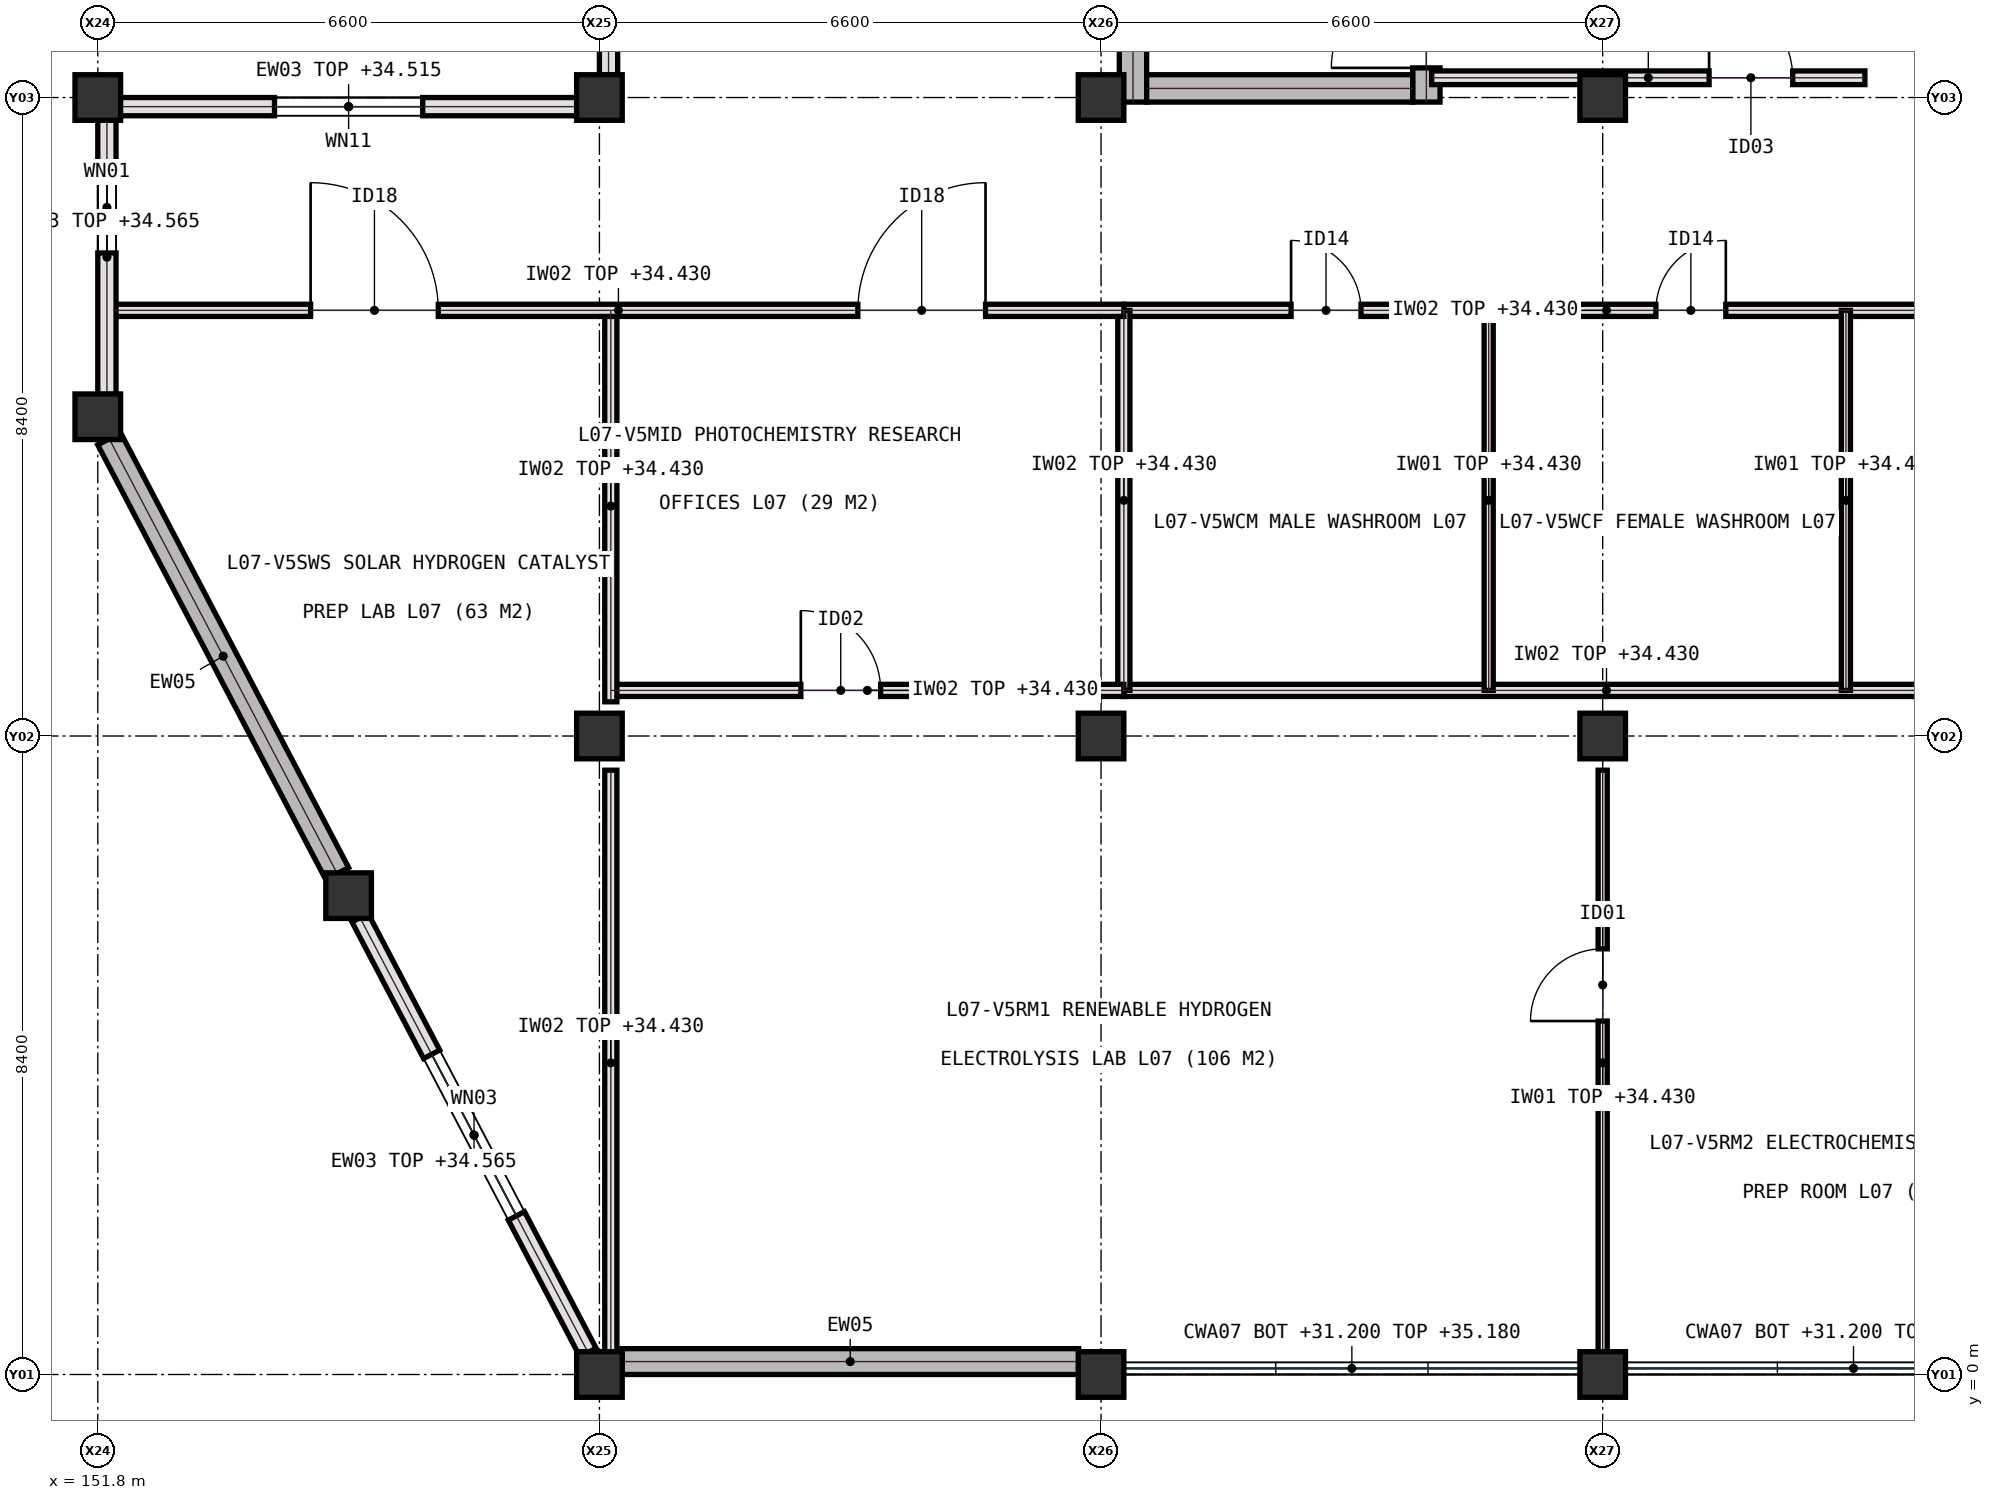
"""IFC4 building model, lengths in metres.
Left out: names, types, materials, properties, quantities, classifications, styles, units other than length and angle.
Written with IfcOpenShell. Run it as: python <this file> out.ifc"""

import sys

from ifc_helpers import new_model, si_unit, direction, frame, frame_2d, origin, origin_2d, place, context, subcontext, project, spatial, rectangle, extrude, element, fill, save


model = new_model("IFC4")
c1 = context("Model", 3, precision=1e-05, world=origin(), true_north=direction((0.0, 1.0)))
c2 = subcontext(c1, "Body", "Model", "MODEL_VIEW")
j1 = project(units=[si_unit("LENGTHUNIT", "METRE"), si_unit("PLANEANGLEUNIT", "RADIAN")], contexts=[c1])
p1 = place(None, origin())
s1 = spatial("IfcSite", under=j1, at=p1, CompositionType="ELEMENT")
p2 = place(p1, origin())
s2 = spatial("IfcBuilding", under=s1, at=p2, CompositionType="ELEMENT")
p3 = place(p2, frame((0.0, 0.0, 31.2)))
s3 = spatial("IfcBuildingStorey", under=s2, at=p3, CompositionType="ELEMENT", Elevation=31.2)
for number, where, z_axis, x_axis in (
    (1, (151.8, 16.8, 0.0), (0.0, 0.0, 1.0), (1.0, 0.0, 0.0)),
    (2, (158.4, 0.0, 0.0), (0.0, 0.0, 1.0), (1.0, 0.0, 0.0)),
    (3, (158.4, 8.4, 0.0), (0.0, 0.0, 1.0), (1.0, 0.0, 0.0)),
    (4, (158.4, 16.8, 0.0), (0.0, 0.0, 1.0), (1.0, 0.0, 0.0)),
    (5, (165.0, 0.0, 0.0), (0.0, 0.0, 1.0), (1.0, 0.0, 0.0)),
    (6, (165.0, 8.4, 0.0), (0.0, 0.0, 1.0), (1.0, 0.0, 0.0)),
    (7, (165.0, 16.8, 0.0), (0.0, 0.0, 1.0), (1.0, 0.0, 0.0)),
    (8, (171.6, 0.0, 0.0), (0.0, 0.0, 1.0), (1.0, 0.0, 0.0)),
    (9, (171.6, 8.4, 0.0), (0.0, 0.0, 1.0), (1.0, 0.0, 0.0)),
    (10, (171.6, 16.8, 0.0), (0.0, 0.0, 1.0), (1.0, 0.0, 0.0)),
    (11, (151.8, 12.6, 0.0), (0.0, 0.0, 1.0), (1.0, 0.0, 0.0)),
    (12, (155.1, 6.3, 0.0), (0.0, 0.0, 1.0), (1.0, 0.0, 0.0)),
):
    element("IfcColumn", number, at=place(p3, frame(where, z_axis=z_axis, x_axis=x_axis)), inside=s3, PredefinedType="COLUMN", context=c2, shape_type="SweptSolid", body=[
        extrude(rectangle(XDim=0.6, YDim=0.6, at=origin_2d()), origin(), (0.0, 0.0, 1.0), 4.2),
    ])
p4 = place(p3, frame((165.3, 14.0, 0.0), z_axis=(0.0, 0.0, 1.0), x_axis=(1.0, 0.0, 0.0)))
e13 = element("IfcWall", 13, at=p4, inside=s3, PredefinedType="PARTITIONING", context=c2, shape_type="SweptSolid", body=[
    extrude(rectangle(XDim=12.7, YDim=0.16, at=frame_2d((6.35, 0.0))), origin(), (0.0, 0.0, 1.0), 3.23),
])
p5 = place(p4, frame((2.2, 0.0, 0.0)))
e14 = element("IfcOpeningElement", 14, at=p5, cuts=e13, PredefinedType="OPENING", context=c2, shape_type="SweptSolid", body=[
    extrude(rectangle(XDim=0.92, YDim=2.08, at=frame_2d((0.46, 1.04))), frame((0.0, 0.09, 0.0), z_axis=(0.0, -1.0, 0.0), x_axis=(1.0, 0.0, 0.0)), (0.0, 0.0, 1.0), 0.18),
])
p6 = place(p4, frame((7.0, 0.0, 0.0)))
e15 = element("IfcOpeningElement", 15, at=p6, cuts=e13, PredefinedType="OPENING", context=c2, shape_type="SweptSolid", body=[
    extrude(rectangle(XDim=0.92, YDim=2.08, at=frame_2d((0.46, 1.04))), frame((0.0, 0.09, 0.0), z_axis=(0.0, -1.0, 0.0), x_axis=(1.0, 0.0, 0.0)), (0.0, 0.0, 1.0), 0.18),
])
p7 = place(p4, frame((11.0, 0.0, 0.0)))
e16 = element("IfcOpeningElement", 16, at=p7, cuts=e13, PredefinedType="OPENING", context=c2, shape_type="SweptSolid", body=[
    extrude(rectangle(XDim=0.92, YDim=2.08, at=frame_2d((0.46, 1.04))), frame((0.0, 0.09, 0.0), z_axis=(0.0, -1.0, 0.0), x_axis=(1.0, 0.0, 0.0)), (0.0, 0.0, 1.0), 0.18),
])
p8 = place(p3, frame((165.3, 9.0, 0.0), z_axis=(0.0, 0.0, 1.0), x_axis=(1.0, 0.0, 0.0)))
e17 = element("IfcWall", 17, at=p8, inside=s3, PredefinedType="PARTITIONING", context=c2, shape_type="SweptSolid", body=[
    extrude(rectangle(XDim=12.7, YDim=0.16, at=frame_2d((6.35, 0.0))), origin(), (0.0, 0.0, 1.0), 3.23),
])
p9 = place(p3, frame((165.3, 9.0, 0.0), z_axis=(0.0, 0.0, 1.0), x_axis=(0.0, 1.0, 0.0)))
e18 = element("IfcWall", 18, at=p9, inside=s3, PredefinedType="PARTITIONING", context=c2, shape_type="SweptSolid", body=[
    extrude(rectangle(XDim=5.0, YDim=0.16, at=frame_2d((2.5, 0.0))), origin(), (0.0, 0.0, 1.0), 3.23),
])
for number, where, z_axis, x_axis in (
    (19, (170.1, 9.0, 0.0), (0.0, 0.0, 1.0), (0.0, 1.0, 0.0)),
    (20, (174.8, 9.0, 0.0), (0.0, 0.0, 1.0), (0.0, 1.0, 0.0)),
):
    element("IfcWall", number, at=place(p3, frame(where, z_axis=z_axis, x_axis=x_axis)), inside=s3, PredefinedType="PARTITIONING", context=c2, shape_type="SweptSolid", body=[
        extrude(rectangle(XDim=5.0, YDim=0.12, at=frame_2d((2.5, 0.0))), origin(), (0.0, 0.0, 1.0), 3.23),
    ])
p10 = place(p3, frame((158.55, 9.0, 0.0), z_axis=(0.0, 0.0, 1.0), x_axis=(1.0, 0.0, 0.0)))
e21 = element("IfcWall", 21, at=p10, inside=s3, PredefinedType="PARTITIONING", context=c2, shape_type="SweptSolid", body=[
    extrude(rectangle(XDim=6.75, YDim=0.16, at=frame_2d((3.375, 0.0))), origin(), (0.0, 0.0, 1.0), 3.23),
])
p11 = place(p10, frame((2.5, 0.0, 0.0)))
e22 = element("IfcOpeningElement", 22, at=p11, cuts=e21, PredefinedType="OPENING", context=c2, shape_type="SweptSolid", body=[
    extrude(rectangle(XDim=1.05, YDim=2.15, at=frame_2d((0.525, 1.075))), frame((0.0, 0.09, 0.0), z_axis=(0.0, -1.0, 0.0), x_axis=(1.0, 0.0, 0.0)), (0.0, 0.0, 1.0), 0.18),
])
p12 = place(p3, frame((171.6, 0.25, 0.0), z_axis=(0.0, 0.0, 1.0), x_axis=(0.0, 1.0, 0.0)))
e23 = element("IfcWall", 23, at=p12, inside=s3, PredefinedType="PARTITIONING", context=c2, shape_type="SweptSolid", body=[
    extrude(rectangle(XDim=7.7, YDim=0.12, at=frame_2d((3.85, 0.0))), origin(), (0.0, 0.0, 1.0), 3.23),
])
p13 = place(p12, frame((4.4, 0.0, 0.0)))
e24 = element("IfcOpeningElement", 24, at=p13, cuts=e23, PredefinedType="OPENING", context=c2, shape_type="SweptSolid", body=[
    extrude(rectangle(XDim=0.95, YDim=2.15, at=frame_2d((0.475, 1.075))), frame((0.0, 0.07, 0.0), z_axis=(0.0, -1.0, 0.0), x_axis=(1.0, 0.0, 0.0)), (0.0, 0.0, 1.0), 0.14),
])
p14 = place(p3, frame((158.55, 0.25, 0.0), z_axis=(0.0, 0.0, 1.0), x_axis=(0.0, 1.0, 0.0)))
e25 = element("IfcWall", 25, at=p14, inside=s3, PredefinedType="PARTITIONING", context=c2, shape_type="SweptSolid", body=[
    extrude(rectangle(XDim=7.7, YDim=0.16, at=frame_2d((3.85, 0.0))), origin(), (0.0, 0.0, 1.0), 3.23),
])
p15 = place(p3, frame((158.55, 8.85, 0.0), z_axis=(0.0, 0.0, 1.0), x_axis=(0.0, 1.0, 0.0)))
e26 = element("IfcWall", 26, at=p15, inside=s3, PredefinedType="PARTITIONING", context=c2, shape_type="SweptSolid", body=[
    extrude(rectangle(XDim=5.15, YDim=0.16, at=frame_2d((2.575, 0.0))), origin(), (0.0, 0.0, 1.0), 3.23),
])
p16 = place(p3, frame((152.0, 14.0, 0.0), z_axis=(0.0, 0.0, 1.0), x_axis=(1.0, 0.0, 0.0)))
e27 = element("IfcWall", 27, at=p16, inside=s3, PredefinedType="PARTITIONING", context=c2, shape_type="SweptSolid", body=[
    extrude(rectangle(XDim=13.3, YDim=0.16, at=frame_2d((6.65, 0.0))), origin(), (0.0, 0.0, 1.0), 3.23),
])
p17 = place(p16, frame((2.6, 0.0, 0.0)))
e28 = element("IfcOpeningElement", 28, at=p17, cuts=e27, PredefinedType="OPENING", context=c2, shape_type="SweptSolid", body=[
    extrude(rectangle(XDim=1.68, YDim=2.28, at=frame_2d((0.84, 1.14))), frame((0.0, 0.09, 0.0), z_axis=(0.0, -1.0, 0.0), x_axis=(1.0, 0.0, 0.0)), (0.0, 0.0, 1.0), 0.18),
])
p18 = place(p16, frame((9.8, 0.0, 0.0)))
e29 = element("IfcOpeningElement", 29, at=p18, cuts=e27, PredefinedType="OPENING", context=c2, shape_type="SweptSolid", body=[
    extrude(rectangle(XDim=1.68, YDim=2.28, at=frame_2d((0.84, 1.14))), frame((0.0, 0.09, 0.0), z_axis=(0.0, -1.0, 0.0), x_axis=(1.0, 0.0, 0.0)), (0.0, 0.0, 1.0), 0.18),
])
p19 = place(p3, frame((158.105, 16.68, 0.0), z_axis=(0.0, 0.0, 1.0), x_axis=(-1.0, 0.0, 0.0)))
e30 = element("IfcWall", 30, at=p19, inside=s3, PredefinedType="SOLIDWALL", context=c2, shape_type="SweptSolid", body=[
    extrude(rectangle(XDim=6.01, YDim=0.24, at=frame_2d((3.005, 0.0))), origin(), (0.0, 0.0, 1.0), 3.315),
])
p20 = place(p19, frame((2.03, 0.0, 0.95)))
e31 = element("IfcOpeningElement", 31, at=p20, cuts=e30, PredefinedType="OPENING", context=c2, shape_type="SweptSolid", body=[
    extrude(rectangle(XDim=1.95, YDim=1.55, at=frame_2d((0.975, 0.775))), frame((0.0, 0.13, 0.0), z_axis=(0.0, -1.0, 0.0), x_axis=(1.0, 0.0, 0.0)), (0.0, 0.0, 1.0), 0.26),
])
p21 = place(p3, frame((158.695, 0.17, 0.0), z_axis=(0.0, 0.0, 1.0), x_axis=(1.0, 0.0, 0.0)))
e32 = element("IfcWall", 32, at=p21, inside=s3, PredefinedType="SHEAR", context=c2, shape_type="SweptSolid", body=[
    extrude(rectangle(XDim=6.01, YDim=0.34, at=frame_2d((3.005, 0.0))), origin(), (0.0, 0.0, 1.0), 3.98),
])
p22 = place(p3, frame((158.52, 24.905, 0.0), z_axis=(0.0, 0.0, 1.0), x_axis=(0.0, -1.0, 0.0)))
e33 = element("IfcWall", 33, at=p22, inside=s3, PredefinedType="SOLIDWALL", context=c2, shape_type="SweptSolid", body=[
    extrude(rectangle(XDim=7.81, YDim=0.24, at=frame_2d((3.905, 0.0))), origin(), (0.0, 0.0, 1.0), 3.265),
])
p23 = place(p22, frame((3.18, 0.0, 0.95)))
e34 = element("IfcOpeningElement", 34, at=p23, cuts=e33, PredefinedType="OPENING", context=c2, shape_type="SweptSolid", body=[
    extrude(rectangle(XDim=1.45, YDim=1.6, at=frame_2d((0.725, 0.8))), frame((0.0, 0.13, 0.0), z_axis=(0.0, -1.0, 0.0), x_axis=(1.0, 0.0, 0.0)), (0.0, 0.0, 1.0), 0.26),
])
p24 = place(p3, frame((151.92, 16.505, 0.0), z_axis=(0.0, 0.0, 1.0), x_axis=(0.0, -1.0, 0.0)))
e35 = element("IfcWall", 35, at=p24, inside=s3, PredefinedType="SOLIDWALL", context=c2, shape_type="SweptSolid", body=[
    extrude(rectangle(XDim=3.61, YDim=0.24, at=frame_2d((1.805, 0.0))), origin(), (0.0, 0.0, 1.0), 3.365),
])
p25 = place(p24, frame((0.55, 0.0, 0.95)))
e36 = element("IfcOpeningElement", 36, at=p25, cuts=e35, PredefinedType="OPENING", context=c2, shape_type="SweptSolid", body=[
    extrude(rectangle(XDim=1.2, YDim=1.5, at=frame_2d((0.6, 0.75))), frame((0.0, 0.13, 0.0), z_axis=(0.0, -1.0, 0.0), x_axis=(1.0, 0.0, 0.0)), (0.0, 0.0, 1.0), 0.26),
])
p26 = place(p3, frame((151.95, 12.31, 0.0), z_axis=(0.0, 0.0, 1.0), x_axis=(0.464471613901, -0.885588007981, 0.0)))
e37 = element("IfcWall", 37, at=p26, inside=s3, PredefinedType="SHEAR", context=c2, shape_type="SweptSolid", body=[
    extrude(rectangle(XDim=6.459, YDim=0.34, at=frame_2d((3.229, 0.0))), origin(), (0.0, 0.0, 1.0), 3.98),
])
p27 = place(p3, frame((155.25, 6.01, 0.0), z_axis=(0.0, 0.0, 1.0), x_axis=(0.464471613901, -0.885588007981, 0.0)))
e38 = element("IfcWall", 38, at=p27, inside=s3, PredefinedType="SOLIDWALL", context=c2, shape_type="SweptSolid", body=[
    extrude(rectangle(XDim=6.459, YDim=0.24, at=frame_2d((3.229, 0.0))), origin(), (0.0, 0.0, 1.0), 3.365),
])
p28 = place(p27, frame((2.03, 0.0, 0.95)))
e39 = element("IfcOpeningElement", 39, at=p28, cuts=e38, PredefinedType="OPENING", context=c2, shape_type="SweptSolid", body=[
    extrude(rectangle(XDim=2.4, YDim=1.6, at=frame_2d((1.2, 0.8))), frame((0.0, 0.13, 0.0), z_axis=(0.0, -1.0, 0.0), x_axis=(1.0, 0.0, 0.0)), (0.0, 0.0, 1.0), 0.26),
])
p29 = place(p3, frame((165.42, 16.74, 0.0), z_axis=(0.0, 0.0, 1.0), x_axis=(0.0, 1.0, 0.0)))
e40 = element("IfcWall", 40, at=p29, inside=s3, PredefinedType="SHEAR", context=c2, shape_type="SweptSolid", body=[
    extrude(rectangle(XDim=8.37, YDim=0.36, at=frame_2d((4.185, 0.0))), origin(), (0.0, 0.0, 1.0), 3.98),
])
p30 = place(p3, frame((169.28, 16.74, 0.0), z_axis=(0.0, 0.0, 1.0), x_axis=(0.0, 1.0, 0.0)))
e41 = element("IfcWall", 41, at=p30, inside=s3, PredefinedType="SHEAR", context=c2, shape_type="SweptSolid", body=[
    extrude(rectangle(XDim=8.37, YDim=0.36, at=frame_2d((4.185, 0.0))), origin(), (0.0, 0.0, 1.0), 3.98),
])
p31 = place(p30, frame((0.45, 0.0, 0.0)))
e42 = element("IfcOpeningElement", 42, at=p31, cuts=e41, PredefinedType="OPENING", context=c2, shape_type="SweptSolid", body=[
    extrude(rectangle(XDim=1.25, YDim=2.15, at=frame_2d((0.625, 1.075))), frame((0.0, 0.19, 0.0), z_axis=(0.0, -1.0, 0.0), x_axis=(1.0, 0.0, 0.0)), (0.0, 0.0, 1.0), 0.38),
])
p32 = place(p3, frame((165.6, 16.92, 0.0), z_axis=(0.0, 0.0, 1.0), x_axis=(1.0, 0.0, 0.0)))
e43 = element("IfcWall", 43, at=p32, inside=s3, PredefinedType="SHEAR", context=c2, shape_type="SweptSolid", body=[
    extrude(rectangle(XDim=3.5, YDim=0.36, at=frame_2d((1.75, 0.0))), origin(), (0.0, 0.0, 1.0), 3.98),
])
p33 = place(p3, frame((169.35, 17.06, 0.0), z_axis=(0.0, 0.0, 1.0), x_axis=(1.0, 0.0, 0.0)))
e44 = element("IfcWall", 44, at=p33, inside=s3, PredefinedType="SOLIDWALL", context=c2, shape_type="SweptSolid", body=[
    extrude(rectangle(XDim=5.7, YDim=0.18, at=frame_2d((2.85, 0.0))), origin(), (0.0, 0.0, 1.0), 3.315),
])
p34 = place(p33, frame((3.65, 0.0, 0.0)))
e45 = element("IfcOpeningElement", 45, at=p34, cuts=e44, PredefinedType="OPENING", context=c2, shape_type="SweptSolid", body=[
    extrude(rectangle(XDim=1.1, YDim=2.15, at=frame_2d((0.55, 1.075))), frame((0.0, 0.1, 0.0), z_axis=(0.0, -1.0, 0.0), x_axis=(1.0, 0.0, 0.0)), (0.0, 0.0, 1.0), 0.2),
])
p35 = place(p5, origin())
e46 = element("IfcDoor", 46, at=p35, inside=s3, OperationType="SINGLE_SWING_LEFT", PredefinedType="DOOR", context=c2, shape_type="SweptSolid", body=[
    extrude(rectangle(XDim=0.92, YDim=2.08, at=frame_2d((0.46, 1.04))), frame((0.0, 0.025, 0.0), z_axis=(0.0, -1.0, 0.0), x_axis=(1.0, 0.0, 0.0)), (0.0, 0.0, 1.0), 0.05),
])
fill(e14, e46)
p36 = place(p6, origin())
e47 = element("IfcDoor", 47, at=p36, inside=s3, OperationType="SINGLE_SWING_RIGHT", PredefinedType="DOOR", context=c2, shape_type="SweptSolid", body=[
    extrude(rectangle(XDim=0.92, YDim=2.08, at=frame_2d((0.46, 1.04))), frame((0.0, 0.025, 0.0), z_axis=(0.0, -1.0, 0.0), x_axis=(1.0, 0.0, 0.0)), (0.0, 0.0, 1.0), 0.05),
])
fill(e15, e47)
p37 = place(p11, origin())
e48 = element("IfcDoor", 48, at=p37, inside=s3, OperationType="SINGLE_SWING_LEFT", PredefinedType="DOOR", context=c2, shape_type="SweptSolid", body=[
    extrude(rectangle(XDim=1.05, YDim=2.15, at=frame_2d((0.525, 1.075))), frame((0.0, 0.025, 0.0), z_axis=(0.0, -1.0, 0.0), x_axis=(1.0, 0.0, 0.0)), (0.0, 0.0, 1.0), 0.05),
])
fill(e22, e48)
p38 = place(p13, origin())
e49 = element("IfcDoor", 49, at=p38, inside=s3, OperationType="SINGLE_SWING_LEFT", PredefinedType="DOOR", context=c2, shape_type="SweptSolid", body=[
    extrude(rectangle(XDim=0.95, YDim=2.15, at=frame_2d((0.475, 1.075))), frame((0.0, 0.025, 0.0), z_axis=(0.0, -1.0, 0.0), x_axis=(1.0, 0.0, 0.0)), (0.0, 0.0, 1.0), 0.05),
])
fill(e24, e49)
p39 = place(p17, origin())
e50 = element("IfcDoor", 50, at=p39, inside=s3, OperationType="SINGLE_SWING_LEFT", PredefinedType="DOOR", context=c2, shape_type="SweptSolid", body=[
    extrude(rectangle(XDim=1.68, YDim=2.28, at=frame_2d((0.84, 1.14))), frame((0.0, 0.025, 0.0), z_axis=(0.0, -1.0, 0.0), x_axis=(1.0, 0.0, 0.0)), (0.0, 0.0, 1.0), 0.05),
])
fill(e28, e50)
p40 = place(p18, origin())
e51 = element("IfcDoor", 51, at=p40, inside=s3, OperationType="SINGLE_SWING_RIGHT", PredefinedType="DOOR", context=c2, shape_type="SweptSolid", body=[
    extrude(rectangle(XDim=1.68, YDim=2.28, at=frame_2d((0.84, 1.14))), frame((0.0, 0.025, 0.0), z_axis=(0.0, -1.0, 0.0), x_axis=(1.0, 0.0, 0.0)), (0.0, 0.0, 1.0), 0.05),
])
fill(e29, e51)
p41 = place(p20, origin())
e52 = element("IfcWindow", 52, at=p41, inside=s3, PartitioningType="SINGLE_PANEL", PredefinedType="WINDOW", context=c2, shape_type="SweptSolid", body=[
    extrude(rectangle(XDim=1.95, YDim=1.55, at=frame_2d((0.975, 0.775))), frame((0.0, 0.03, 0.0), z_axis=(0.0, -1.0, 0.0), x_axis=(1.0, 0.0, 0.0)), (0.0, 0.0, 1.0), 0.06),
])
fill(e31, e52)
p42 = place(p25, origin())
e53 = element("IfcWindow", 53, at=p42, inside=s3, PartitioningType="SINGLE_PANEL", PredefinedType="WINDOW", context=c2, shape_type="SweptSolid", body=[
    extrude(rectangle(XDim=1.2, YDim=1.5, at=frame_2d((0.6, 0.75))), frame((0.0, 0.03, 0.0), z_axis=(0.0, -1.0, 0.0), x_axis=(1.0, 0.0, 0.0)), (0.0, 0.0, 1.0), 0.06),
])
fill(e36, e53)
p43 = place(p28, origin())
e54 = element("IfcWindow", 54, at=p43, inside=s3, PartitioningType="SINGLE_PANEL", PredefinedType="WINDOW", context=c2, shape_type="SweptSolid", body=[
    extrude(rectangle(XDim=2.4, YDim=1.6, at=frame_2d((1.2, 0.8))), frame((0.0, 0.03, 0.0), z_axis=(0.0, -1.0, 0.0), x_axis=(1.0, 0.0, 0.0)), (0.0, 0.0, 1.0), 0.06),
])
fill(e39, e54)
p44 = place(p31, origin())
e55 = element("IfcDoor", 55, at=p44, inside=s3, OperationType="SINGLE_SWING_LEFT", PredefinedType="DOOR", context=c2, shape_type="SweptSolid", body=[
    extrude(rectangle(XDim=1.25, YDim=2.15, at=frame_2d((0.625, 1.075))), frame((0.0, 0.025, 0.0), z_axis=(0.0, -1.0, 0.0), x_axis=(1.0, 0.0, 0.0)), (0.0, 0.0, 1.0), 0.05),
])
fill(e42, e55)
p45 = place(p34, origin())
e56 = element("IfcDoor", 56, at=p45, inside=s3, OperationType="SINGLE_SWING_LEFT", PredefinedType="DOOR", context=c2, shape_type="SweptSolid", body=[
    extrude(rectangle(XDim=1.1, YDim=2.15, at=frame_2d((0.55, 1.075))), frame((0.0, 0.025, 0.0), z_axis=(0.0, -1.0, 0.0), x_axis=(1.0, 0.0, 0.0)), (0.0, 0.0, 1.0), 0.05),
])
fill(e45, e56)
save(model, sys.argv[1])
